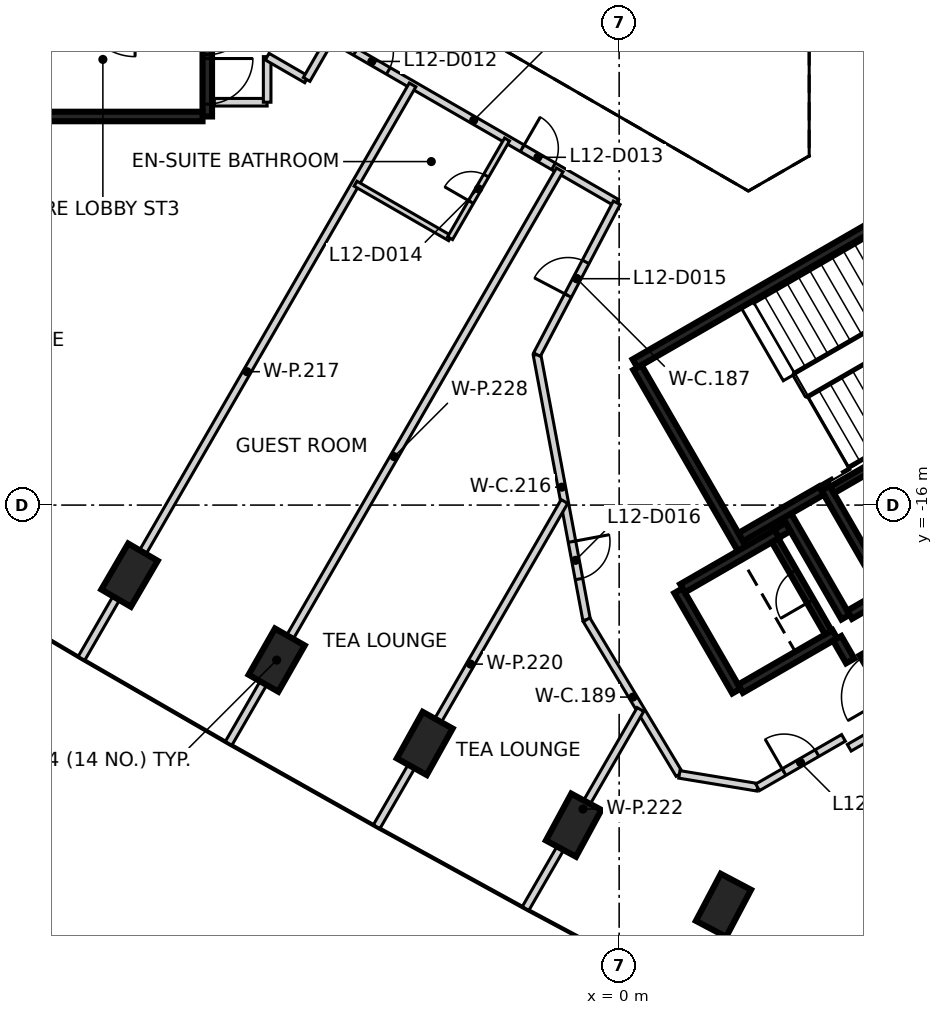
"""IFC4 building model, lengths in metres.
Left out: names, types, materials, properties, quantities, classifications, styles, units other than length and angle.
Written with IfcOpenShell. Run it as: python <this file> out.ifc"""

import sys

from ifc_helpers import new_model, si_unit, direction, frame, frame_2d, origin, origin_2d, place, context, subcontext, project, spatial, rectangle, extrude, element, fill, save


model = new_model("IFC4")
c1 = context("Model", 3, precision=1e-05, world=origin(), true_north=direction((0.0, 1.0)))
c2 = subcontext(c1, "Body", "Model", "MODEL_VIEW")
j1 = project(units=[si_unit("LENGTHUNIT", "METRE"), si_unit("PLANEANGLEUNIT", "RADIAN")], contexts=[c1])
p1 = place(None, origin())
s1 = spatial("IfcSite", under=j1, at=p1, CompositionType="ELEMENT")
p2 = place(p1, origin())
s2 = spatial("IfcBuilding", under=s1, at=p2, CompositionType="ELEMENT")
p3 = place(p2, frame((0.0, 0.0, 56.6)))
s3 = spatial("IfcBuildingStorey", under=s2, at=p3, CompositionType="ELEMENT", Elevation=56.6)
for number, where, z_axis, x_axis in (
    (1, (-12.883, -17.844, -0.475), (0.0, 0.0, 1.0), (0.505, 0.863, 0.0)),
    (2, (-9.011, -20.079, -0.475), (0.0, 0.0, 1.0), (0.495, 0.869, 0.0)),
    (3, (-5.116, -22.272, -0.475), (0.0, 0.0, 1.0), (0.486, 0.874, 0.0)),
    (4, (-1.197, -24.423, -0.475), (0.0, 0.0, 1.0), (0.476, 0.879, 0.0)),
    (5, (2.745, -26.531, -0.475), (0.0, 0.0, 1.0), (0.467, 0.884, 0.0)),
):
    element("IfcColumn", number, at=place(p3, frame(where, z_axis=z_axis, x_axis=x_axis)), inside=s3, PredefinedType="COLUMN", context=c2, shape_type="SweptSolid", body=[
        extrude(rectangle(XDim=1.4, YDim=0.9, at=origin_2d()), origin(), (0.0, 0.0, 1.0), 3.6),
    ])
p4 = place(p3, frame((-10.837, 5.775, 0.0), z_axis=(0.0, 0.0, 1.0), x_axis=(0.0, -1.0, 0.0)))
e6 = element("IfcWall", 6, at=p4, inside=s3, PredefinedType="SHEAR", context=c2, shape_type="SweptSolid", body=[
    extrude(rectangle(XDim=11.55, YDim=0.25, at=frame_2d((5.775, 0.0))), origin(), (0.0, 0.0, 1.0), 3.125),
])
p5 = place(p4, frame((10.025, 0.0, 0.0)))
e7 = element("IfcOpeningElement", 7, at=p5, cuts=e6, PredefinedType="OPENING", context=c2, shape_type="SweptSolid", body=[
    extrude(rectangle(XDim=1.2, YDim=2.1, at=frame_2d((0.6, 1.05))), frame((0.0, 0.135, 0.0), z_axis=(0.0, -1.0, 0.0), x_axis=(1.0, 0.0, 0.0)), (0.0, 0.0, 1.0), 0.27),
])
p6 = place(p4, frame((8.725, 0.0, 0.0)))
e8 = element("IfcOpeningElement", 8, at=p6, cuts=e6, PredefinedType="OPENING", context=c2, shape_type="SweptSolid", body=[
    extrude(rectangle(XDim=1.2, YDim=2.1, at=frame_2d((0.6, 1.05))), frame((0.0, 0.135, 0.0), z_axis=(0.0, -1.0, 0.0), x_axis=(1.0, 0.0, 0.0)), (0.0, 0.0, 1.0), 0.27),
])
p7 = place(p3, frame((-10.963, -5.775, 0.0), z_axis=(0.0, 0.0, 1.0), x_axis=(-1.0, 0.0, 0.0)))
e9 = element("IfcWall", 9, at=p7, inside=s3, PredefinedType="SHEAR", context=c2, shape_type="SweptSolid", body=[
    extrude(rectangle(XDim=5.225, YDim=0.25, at=frame_2d((2.612, 0.0))), origin(), (0.0, 0.0, 1.0), 3.125),
])
p8 = place(p3, frame((0.417, -12.273, 0.0), z_axis=(0.0, 0.0, 1.0), x_axis=(0.866021906294, 0.500006057782, 0.0)))
e10 = element("IfcWall", 10, at=p8, inside=s3, PredefinedType="SHEAR", context=c2, shape_type="SweptSolid", body=[
    extrude(rectangle(XDim=11.55, YDim=0.25, at=frame_2d((5.775, 0.0))), origin(), (0.0, 0.0, 1.0), 3.125),
])
p9 = place(p8, frame((10.025, 0.0, 0.0)))
e11 = element("IfcOpeningElement", 11, at=p9, cuts=e10, PredefinedType="OPENING", context=c2, shape_type="SweptSolid", body=[
    extrude(rectangle(XDim=1.2, YDim=2.1, at=frame_2d((0.6, 1.05))), frame((0.0, 0.135, 0.0), z_axis=(0.0, -1.0, 0.0), x_axis=(1.0, 0.0, 0.0)), (0.0, 0.0, 1.0), 0.27),
])
p10 = place(p8, frame((8.725, 0.0, 0.0)))
e12 = element("IfcOpeningElement", 12, at=p10, cuts=e10, PredefinedType="OPENING", context=c2, shape_type="SweptSolid", body=[
    extrude(rectangle(XDim=1.2, YDim=2.1, at=frame_2d((0.6, 1.05))), frame((0.0, 0.135, 0.0), z_axis=(0.0, -1.0, 0.0), x_axis=(1.0, 0.0, 0.0)), (0.0, 0.0, 1.0), 0.27),
])
p11 = place(p3, frame((3.235, -17.153, 0.0), z_axis=(0.0, 0.0, 1.0), x_axis=(-0.500008851346, 0.866020293397, 0.0)))
e13 = element("IfcWall", 13, at=p11, inside=s3, PredefinedType="SHEAR", context=c2, shape_type="SweptSolid", body=[
    extrude(rectangle(XDim=5.51, YDim=0.25, at=frame_2d((2.755, 0.0))), origin(), (0.0, 0.0, 1.0), 3.125),
])
p12 = place(p3, frame((7.031, -18.327, 0.0), z_axis=(0.0, 0.0, 1.0), x_axis=(-0.499971222258, 0.866042017984, 0.0)))
e14 = element("IfcWall", 14, at=p12, inside=s3, PredefinedType="SHEAR", context=c2, shape_type="SweptSolid", body=[
    extrude(rectangle(XDim=3.2, YDim=0.25, at=frame_2d((1.6, 0.0))), origin(), (0.0, 0.0, 1.0), 3.125),
])
p13 = place(p3, frame((3.085, -20.894, 0.0), z_axis=(0.0, 0.0, 1.0), x_axis=(-0.499978833458, 0.866037623948, 0.0)))
e15 = element("IfcWall", 15, at=p13, inside=s3, PredefinedType="SHEAR", context=c2, shape_type="SweptSolid", body=[
    extrude(rectangle(XDim=3.05, YDim=0.25, at=frame_2d((1.525, 0.0))), origin(), (0.0, 0.0, 1.0), 3.125),
])
p14 = place(p3, frame((1.669, -18.19, 0.0), z_axis=(0.0, 0.0, 1.0), x_axis=(0.866042235819, 0.499970844928, 0.0)))
e16 = element("IfcWall", 16, at=p14, inside=s3, PredefinedType="SHEAR", context=c2, shape_type="SweptSolid", body=[
    extrude(rectangle(XDim=2.865, YDim=0.25, at=frame_2d((1.432, 0.0))), origin(), (0.0, 0.0, 1.0), 3.125),
])
p15 = place(p3, frame((5.675, -19.399, 0.0), z_axis=(0.0, 0.0, 1.0), x_axis=(-0.866026637627, -0.499997862916, 0.0)))
e17 = element("IfcWall", 17, at=p15, inside=s3, PredefinedType="SHEAR", context=c2, shape_type="SweptSolid", body=[
    extrude(rectangle(XDim=2.865, YDim=0.25, at=frame_2d((1.432, 0.0))), origin(), (0.0, 0.0, 1.0), 3.125),
])
p16 = place(p3, frame((4.414, -16.276, 0.0), z_axis=(0.0, 0.0, 1.0), x_axis=(0.500003324108, -0.866023484601, 0.0)))
e18 = element("IfcWall", 18, at=p16, inside=s3, PredefinedType="SHEAR", context=c2, shape_type="SweptSolid", body=[
    extrude(rectangle(XDim=3.085, YDim=0.25, at=frame_2d((1.542, 0.0))), origin(), (0.0, 0.0, 1.0), 3.125),
])
p17 = place(p3, frame((5.322, -15.619, 0.0), z_axis=(0.0, 0.0, 1.0), x_axis=(-0.866026229868, -0.499998569178, 0.0)))
e19 = element("IfcWall", 19, at=p17, inside=s3, PredefinedType="SHEAR", context=c2, shape_type="SweptSolid", body=[
    extrude(rectangle(XDim=2.449, YDim=0.25, at=frame_2d((1.225, 0.0))), origin(), (0.0, 0.0, 1.0), 3.125),
])
p18 = place(p3, frame((7.367, -21.51, 0.0), z_axis=(0.0, 0.0, 1.0), x_axis=(-0.499983108224, 0.866035156036, 0.0)))
e20 = element("IfcWall", 20, at=p18, inside=s3, PredefinedType="SHEAR", context=c2, shape_type="SweptSolid", body=[
    extrude(rectangle(XDim=1.865, YDim=0.25, at=frame_2d((0.932, 0.0))), origin(), (0.0, 0.0, 1.0), 3.125),
])
p19 = place(p18, frame((0.535, 0.0, 0.0)))
e21 = element("IfcOpeningElement", 21, at=p19, cuts=e20, PredefinedType="OPENING", context=c2, shape_type="SweptSolid", body=[
    extrude(rectangle(XDim=1.25, YDim=2.1, at=frame_2d((0.625, 1.05))), frame((0.0, 0.135, 0.0), z_axis=(0.0, -1.0, 0.0), x_axis=(1.0, 0.0, 0.0)), (0.0, 0.0, 1.0), 0.27),
])
p20 = place(p3, frame((6.065, -18.885, 0.0), z_axis=(0.0, 0.0, 1.0), x_axis=(0.866017078145, 0.500014420154, 0.0)))
e22 = element("IfcWall", 22, at=p20, inside=s3, PredefinedType="SHEAR", context=c2, shape_type="SweptSolid", body=[
    extrude(rectangle(XDim=0.989, YDim=0.25, at=frame_2d((0.495, 0.0))), origin(), (0.0, 0.0, 1.0), 3.125),
])
p21 = place(p3, frame((6.08, -20.1, 0.0), z_axis=(0.0, 0.0, 1.0), x_axis=(-0.500051773299, 0.865995510393, 0.0)))
e23 = element("IfcWall", 23, at=p21, inside=s3, PredefinedType="SHEAR", context=c2, shape_type="SweptSolid", body=[
    extrude(rectangle(XDim=0.685, YDim=0.25, at=frame_2d((0.342, 0.0))), origin(), (0.0, 0.0, 1.0), 3.125),
])
p22 = place(p3, frame((4.145, -16.749, 0.0), z_axis=(0.0, 0.0, 1.0), x_axis=(0.866185586049, 0.49972245349, 0.0)))
e24 = element("IfcWall", 24, at=p22, inside=s3, PredefinedType="SHEAR", context=c2, shape_type="SweptSolid", body=[
    extrude(rectangle(XDim=0.344, YDim=0.25, at=frame_2d((0.172, 0.0))), origin(), (0.0, 0.0, 1.0), 3.125),
])
p23 = place(p3, frame((10.538, -12.752, 0.0), z_axis=(0.0, 0.0, 1.0), x_axis=(-0.866038630372, -0.499977090179, 0.0)))
e25 = element("IfcWall", 25, at=p23, inside=s3, PredefinedType="SHEAR", context=c2, shape_type="SweptSolid", body=[
    extrude(rectangle(XDim=5.699, YDim=0.2, at=frame_2d((2.85, 0.0))), origin(), (0.0, 0.0, 1.0), 3.125),
])
p24 = place(p3, frame((5.503, -19.352, 0.0), z_axis=(0.0, 0.0, 1.0), x_axis=(-0.499986818241, 0.866033014143, 0.0)))
e26 = element("IfcWall", 26, at=p24, inside=s3, PredefinedType="SHEAR", context=c2, shape_type="SweptSolid", body=[
    extrude(rectangle(XDim=2.798, YDim=0.2, at=frame_2d((1.399, 0.0))), origin(), (0.0, 0.0, 1.0), 3.125),
])
p25 = place(p24, frame((0.949, 0.0, 0.0)))
e27 = element("IfcOpeningElement", 27, at=p25, cuts=e26, PredefinedType="OPENING", context=c2, shape_type="SweptSolid", body=[
    extrude(rectangle(XDim=0.9, YDim=2.1, at=frame_2d((0.45, 1.05))), frame((0.0, 0.11, 0.0), z_axis=(0.0, -1.0, 0.0), x_axis=(1.0, 0.0, 0.0)), (0.0, 0.0, 1.0), 0.22),
])
p26 = place(p3, frame((-10.652, -5.4, 0.0), z_axis=(0.0, 0.0, 1.0), x_axis=(1.0, 0.0, 0.0)))
e28 = element("IfcWall", 28, at=p26, inside=s3, PredefinedType="PARTITIONING", context=c2, shape_type="SweptSolid", body=[
    extrude(rectangle(XDim=1.39, YDim=0.2, at=frame_2d((0.695, 0.0))), origin(), (0.0, 0.0, 1.0), 3.125),
])
for number, where, z_axis, x_axis in (
    (29, (-9.262, -5.4, 0.0), (0.0, 0.0, 1.0), (0.0, 1.0, 0.0)),
    (30, (-9.262, -4.2, 0.0), (0.0, 0.0, 1.0), (0.866, -0.5, 0.0)),
):
    element("IfcWall", number, at=place(p3, frame(where, z_axis=z_axis, x_axis=x_axis)), inside=s3, PredefinedType="PARTITIONING", context=c2, shape_type="SweptSolid", body=[
        extrude(rectangle(XDim=1.2, YDim=0.2, at=frame_2d((0.6, 0.0))), origin(), (0.0, 0.0, 1.0), 3.125),
    ])
p27 = place(p3, frame((-8.223, -4.8, 0.0), z_axis=(0.0, 0.0, 1.0), x_axis=(0.499866914522, 0.866102227088, 0.0)))
e31 = element("IfcWall", 31, at=p27, inside=s3, PredefinedType="PARTITIONING", context=c2, shape_type="SweptSolid", body=[
    extrude(rectangle(XDim=1.268, YDim=0.2, at=frame_2d((0.634, 0.0))), origin(), (0.0, 0.0, 1.0), 3.125),
])
p28 = place(p3, frame((-7.589, -3.702, 0.0), z_axis=(0.0, 0.0, 1.0), x_axis=(0.865995139556, -0.500052415518, 0.0)))
e32 = element("IfcWall", 32, at=p28, inside=s3, PredefinedType="PARTITIONING", context=c2, shape_type="SweptSolid", body=[
    extrude(rectangle(XDim=8.689, YDim=0.2, at=frame_2d((4.344, 0.0))), origin(), (0.0, 0.0, 1.0), 3.125),
])
p29 = place(p28, frame((0.749, 0.0, 0.0)))
e33 = element("IfcOpeningElement", 33, at=p29, cuts=e32, PredefinedType="OPENING", context=c2, shape_type="SweptSolid", body=[
    extrude(rectangle(XDim=1.0, YDim=2.1, at=frame_2d((0.5, 1.05))), frame((0.0, 0.11, 0.0), z_axis=(0.0, -1.0, 0.0), x_axis=(1.0, 0.0, 0.0)), (0.0, 0.0, 1.0), 0.22),
])
p30 = place(p28, frame((5.819, 0.0, 0.0)))
e34 = element("IfcOpeningElement", 34, at=p30, cuts=e32, PredefinedType="OPENING", context=c2, shape_type="SweptSolid", body=[
    extrude(rectangle(XDim=0.95, YDim=2.1, at=frame_2d((0.475, 1.05))), frame((0.0, 0.11, 0.0), z_axis=(0.0, -1.0, 0.0), x_axis=(1.0, 0.0, 0.0)), (0.0, 0.0, 1.0), 0.22),
])
p31 = place(p3, frame((-2.162, -12.042, 0.0), z_axis=(0.0, 0.0, 1.0), x_axis=(0.183949825522, -0.982935634561, 0.0)))
e35 = element("IfcWall", 35, at=p31, inside=s3, PredefinedType="PARTITIONING", context=c2, shape_type="SweptSolid", body=[
    extrude(rectangle(XDim=7.094, YDim=0.2, at=frame_2d((3.547, 0.0))), origin(), (0.0, 0.0, 1.0), 3.125),
])
p32 = place(p31, frame((5.006, 0.0, 0.0)))
e36 = element("IfcOpeningElement", 36, at=p32, cuts=e35, PredefinedType="OPENING", context=c2, shape_type="SweptSolid", body=[
    extrude(rectangle(XDim=1.0, YDim=2.1, at=frame_2d((0.5, 1.05))), frame((0.0, 0.11, 0.0), z_axis=(0.0, -1.0, 0.0), x_axis=(1.0, 0.0, 0.0)), (0.0, 0.0, 1.0), 0.22),
])
p33 = place(p3, frame((-2.162, -12.041, 0.0), z_axis=(0.0, 0.0, 1.0), x_axis=(0.464956890881, 0.885333321197, 0.0)))
e37 = element("IfcWall", 37, at=p33, inside=s3, PredefinedType="PARTITIONING", context=c2, shape_type="SweptSolid", body=[
    extrude(rectangle(XDim=4.512, YDim=0.2, at=frame_2d((2.256, 0.0))), origin(), (0.0, 0.0, 1.0), 3.125),
])
p34 = place(p33, frame((1.756, 0.0, 0.0)))
e38 = element("IfcOpeningElement", 38, at=p34, cuts=e37, PredefinedType="OPENING", context=c2, shape_type="SweptSolid", body=[
    extrude(rectangle(XDim=1.0, YDim=2.1, at=frame_2d((0.5, 1.05))), frame((0.0, 0.11, 0.0), z_axis=(0.0, -1.0, 0.0), x_axis=(1.0, 0.0, 0.0)), (0.0, 0.0, 1.0), 0.22),
])
p35 = place(p3, frame((-0.858, -19.017, 0.0), z_axis=(0.0, 0.0, 1.0), x_axis=(0.514647068805, -0.857402119528, 0.0)))
e39 = element("IfcWall", 39, at=p35, inside=s3, PredefinedType="PARTITIONING", context=c2, shape_type="SweptSolid", body=[
    extrude(rectangle(XDim=4.745, YDim=0.2, at=frame_2d((2.373, 0.0))), origin(), (0.0, 0.0, 1.0), 3.125),
])
p36 = place(p3, frame((1.584, -23.086, 0.0), z_axis=(0.0, 0.0, 1.0), x_axis=(0.986633159246, -0.162957077405, 0.0)))
e40 = element("IfcWall", 40, at=p36, inside=s3, PredefinedType="PARTITIONING", context=c2, shape_type="SweptSolid", body=[
    extrude(rectangle(XDim=2.087, YDim=0.2, at=frame_2d((1.043, 0.0))), origin(), (0.0, 0.0, 1.0), 3.125),
])
p37 = place(p3, frame((3.643, -23.426, 0.0), z_axis=(0.0, 0.0, 1.0), x_axis=(0.866654350985, 0.498909045738, 0.0)))
e41 = element("IfcWall", 41, at=p37, inside=s3, PredefinedType="PARTITIONING", context=c2, shape_type="SweptSolid", body=[
    extrude(rectangle(XDim=2.608, YDim=0.2, at=frame_2d((1.304, 0.0))), origin(), (0.0, 0.0, 1.0), 3.125),
])
p38 = place(p37, frame((0.804, 0.0, 0.0)))
e42 = element("IfcOpeningElement", 42, at=p38, cuts=e41, PredefinedType="OPENING", context=c2, shape_type="SweptSolid", body=[
    extrude(rectangle(XDim=1.0, YDim=2.1, at=frame_2d((0.5, 1.05))), frame((0.0, 0.11, 0.0), z_axis=(0.0, -1.0, 0.0), x_axis=(1.0, 0.0, 0.0)), (0.0, 0.0, 1.0), 0.22),
])
p39 = place(p3, frame((6.054, -22.385, 0.0), z_axis=(0.0, 0.0, 1.0), x_axis=(0.86593101922, 0.500163443238, 0.0)))
e43 = element("IfcWall", 43, at=p39, inside=s3, PredefinedType="PARTITIONING", context=c2, shape_type="SweptSolid", body=[
    extrude(rectangle(XDim=1.39, YDim=0.2, at=frame_2d((0.695, 0.0))), origin(), (0.0, 0.0, 1.0), 3.125),
])
p40 = place(p3, frame((-14.148, -20.035, 0.0), z_axis=(0.0, 0.0, 1.0), x_axis=(0.500005855417, 0.866022023131, 0.0)))
e44 = element("IfcWall", 44, at=p40, inside=s3, PredefinedType="PARTITIONING", context=c2, shape_type="SweptSolid", body=[
    extrude(rectangle(XDim=17.425, YDim=0.2, at=frame_2d((8.712, 0.0))), origin(), (0.0, 0.0, 1.0), 3.125),
])
p41 = place(p3, frame((-10.276, -22.271, 0.0), z_axis=(0.0, 0.0, 1.0), x_axis=(0.49999372146, 0.866029028671, 0.0)))
e45 = element("IfcWall", 45, at=p41, inside=s3, PredefinedType="PARTITIONING", context=c2, shape_type="SweptSolid", body=[
    extrude(rectangle(XDim=17.425, YDim=0.2, at=frame_2d((8.712, 0.0))), origin(), (0.0, 0.0, 1.0), 3.125),
])
p42 = place(p3, frame((-6.381, -24.464, 0.0), z_axis=(0.0, 0.0, 1.0), x_axis=(0.500007577232, 0.866021029023, 0.0)))
e46 = element("IfcWall", 46, at=p42, inside=s3, PredefinedType="PARTITIONING", context=c2, shape_type="SweptSolid", body=[
    extrude(rectangle(XDim=9.883, YDim=0.2, at=frame_2d((4.941, 0.0))), origin(), (0.0, 0.0, 1.0), 3.125),
])
p43 = place(p3, frame((-2.462, -26.615, 0.0), z_axis=(0.0, 0.0, 1.0), x_axis=(0.49992636536, 0.86606791259, 0.0)))
e47 = element("IfcWall", 47, at=p43, inside=s3, PredefinedType="PARTITIONING", context=c2, shape_type="SweptSolid", body=[
    extrude(rectangle(XDim=6.046, YDim=0.2, at=frame_2d((3.023, 0.0))), origin(), (0.0, 0.0, 1.0), 3.125),
])
p44 = place(p3, frame((-6.936, -7.543, 0.0), z_axis=(0.0, 0.0, 1.0), x_axis=(0.866153027342, -0.499778884334, 0.0)))
e48 = element("IfcWall", 48, at=p44, inside=s3, PredefinedType="PARTITIONING", context=c2, shape_type="SweptSolid", body=[
    extrude(rectangle(XDim=2.871, YDim=0.15, at=frame_2d((1.436, 0.0))), origin(), (0.0, 0.0, 1.0), 3.125),
])
p45 = place(p3, frame((-4.449, -8.978, 0.0), z_axis=(0.0, 0.0, 1.0), x_axis=(0.499745940409, 0.866172035478, 0.0)))
e49 = element("IfcWall", 49, at=p45, inside=s3, PredefinedType="PARTITIONING", context=c2, shape_type="SweptSolid", body=[
    extrude(rectangle(XDim=3.0, YDim=0.15, at=frame_2d((1.5, 0.0))), origin(), (0.0, 0.0, 1.0), 3.125),
])
p46 = place(p45, frame((1.1, 0.0, 0.0)))
e50 = element("IfcOpeningElement", 50, at=p46, cuts=e49, PredefinedType="OPENING", context=c2, shape_type="SweptSolid", body=[
    extrude(rectangle(XDim=0.8, YDim=2.1, at=frame_2d((0.4, 1.05))), frame((0.0, 0.085, 0.0), z_axis=(0.0, -1.0, 0.0), x_axis=(1.0, 0.0, 0.0)), (0.0, 0.0, 1.0), 0.17),
])
p47 = place(p5, origin())
e51 = element("IfcDoor", 51, at=p47, inside=s3, OperationType="SINGLE_SWING_LEFT", PredefinedType="DOOR", context=c2, shape_type="SweptSolid", body=[
    extrude(rectangle(XDim=1.2, YDim=2.1, at=frame_2d((0.6, 1.05))), frame((0.0, 0.025, 0.0), z_axis=(0.0, -1.0, 0.0), x_axis=(1.0, 0.0, 0.0)), (0.0, 0.0, 1.0), 0.05),
])
fill(e7, e51)
p48 = place(p6, origin())
e52 = element("IfcDoor", 52, at=p48, inside=s3, OperationType="SINGLE_SWING_RIGHT", PredefinedType="DOOR", context=c2, shape_type="SweptSolid", body=[
    extrude(rectangle(XDim=1.2, YDim=2.1, at=frame_2d((0.6, 1.05))), frame((0.0, 0.025, 0.0), z_axis=(0.0, -1.0, 0.0), x_axis=(1.0, 0.0, 0.0)), (0.0, 0.0, 1.0), 0.05),
])
fill(e8, e52)
p49 = place(p25, origin())
e53 = element("IfcDoor", 53, at=p49, inside=s3, OperationType="SINGLE_SWING_RIGHT", PredefinedType="DOOR", context=c2, shape_type="SweptSolid", body=[
    extrude(rectangle(XDim=0.9, YDim=2.1, at=frame_2d((0.45, 1.05))), frame((0.0, 0.025, 0.0), z_axis=(0.0, -1.0, 0.0), x_axis=(1.0, 0.0, 0.0)), (0.0, 0.0, 1.0), 0.05),
])
fill(e27, e53)
p50 = place(p29, frame((1.0, 0.0, 0.0), z_axis=(0.0, 0.0, 1.0), x_axis=(-1.0, 0.0, 0.0)))
e54 = element("IfcDoor", 54, at=p50, inside=s3, OperationType="SINGLE_SWING_LEFT", PredefinedType="DOOR", context=c2, shape_type="SweptSolid", body=[
    extrude(rectangle(XDim=1.0, YDim=2.1, at=frame_2d((0.5, 1.05))), frame((0.0, 0.025, 0.0), z_axis=(0.0, -1.0, 0.0), x_axis=(1.0, 0.0, 0.0)), (0.0, 0.0, 1.0), 0.05),
])
fill(e33, e54)
p51 = place(p30, frame((0.95, 0.0, 0.0), z_axis=(0.0, 0.0, 1.0), x_axis=(-1.0, 0.0, 0.0)))
e55 = element("IfcDoor", 55, at=p51, inside=s3, OperationType="SINGLE_SWING_LEFT", PredefinedType="DOOR", context=c2, shape_type="SweptSolid", body=[
    extrude(rectangle(XDim=0.95, YDim=2.1, at=frame_2d((0.475, 1.05))), frame((0.0, 0.025, 0.0), z_axis=(0.0, -1.0, 0.0), x_axis=(1.0, 0.0, 0.0)), (0.0, 0.0, 1.0), 0.05),
])
fill(e34, e55)
p52 = place(p46, origin())
e56 = element("IfcDoor", 56, at=p52, inside=s3, OperationType="SINGLE_SWING_LEFT", PredefinedType="DOOR", context=c2, shape_type="SweptSolid", body=[
    extrude(rectangle(XDim=0.8, YDim=2.1, at=frame_2d((0.4, 1.05))), frame((0.0, 0.025, 0.0), z_axis=(0.0, -1.0, 0.0), x_axis=(1.0, 0.0, 0.0)), (0.0, 0.0, 1.0), 0.05),
])
fill(e50, e56)
p53 = place(p34, origin())
e57 = element("IfcDoor", 57, at=p53, inside=s3, OperationType="SINGLE_SWING_LEFT", PredefinedType="DOOR", context=c2, shape_type="SweptSolid", body=[
    extrude(rectangle(XDim=1.0, YDim=2.1, at=frame_2d((0.5, 1.05))), frame((0.0, 0.025, 0.0), z_axis=(0.0, -1.0, 0.0), x_axis=(1.0, 0.0, 0.0)), (0.0, 0.0, 1.0), 0.05),
])
fill(e38, e57)
p54 = place(p32, frame((1.0, 0.0, 0.0), z_axis=(0.0, 0.0, 1.0), x_axis=(-1.0, 0.0, 0.0)))
e58 = element("IfcDoor", 58, at=p54, inside=s3, OperationType="SINGLE_SWING_LEFT", PredefinedType="DOOR", context=c2, shape_type="SweptSolid", body=[
    extrude(rectangle(XDim=1.0, YDim=2.1, at=frame_2d((0.5, 1.05))), frame((0.0, 0.025, 0.0), z_axis=(0.0, -1.0, 0.0), x_axis=(1.0, 0.0, 0.0)), (0.0, 0.0, 1.0), 0.05),
])
fill(e36, e58)
p55 = place(p38, frame((1.0, 0.0, 0.0), z_axis=(0.0, 0.0, 1.0), x_axis=(-1.0, 0.0, 0.0)))
e59 = element("IfcDoor", 59, at=p55, inside=s3, OperationType="SINGLE_SWING_LEFT", PredefinedType="DOOR", context=c2, shape_type="SweptSolid", body=[
    extrude(rectangle(XDim=1.0, YDim=2.1, at=frame_2d((0.5, 1.05))), frame((0.0, 0.025, 0.0), z_axis=(0.0, -1.0, 0.0), x_axis=(1.0, 0.0, 0.0)), (0.0, 0.0, 1.0), 0.05),
])
fill(e42, e59)
save(model, sys.argv[1])
